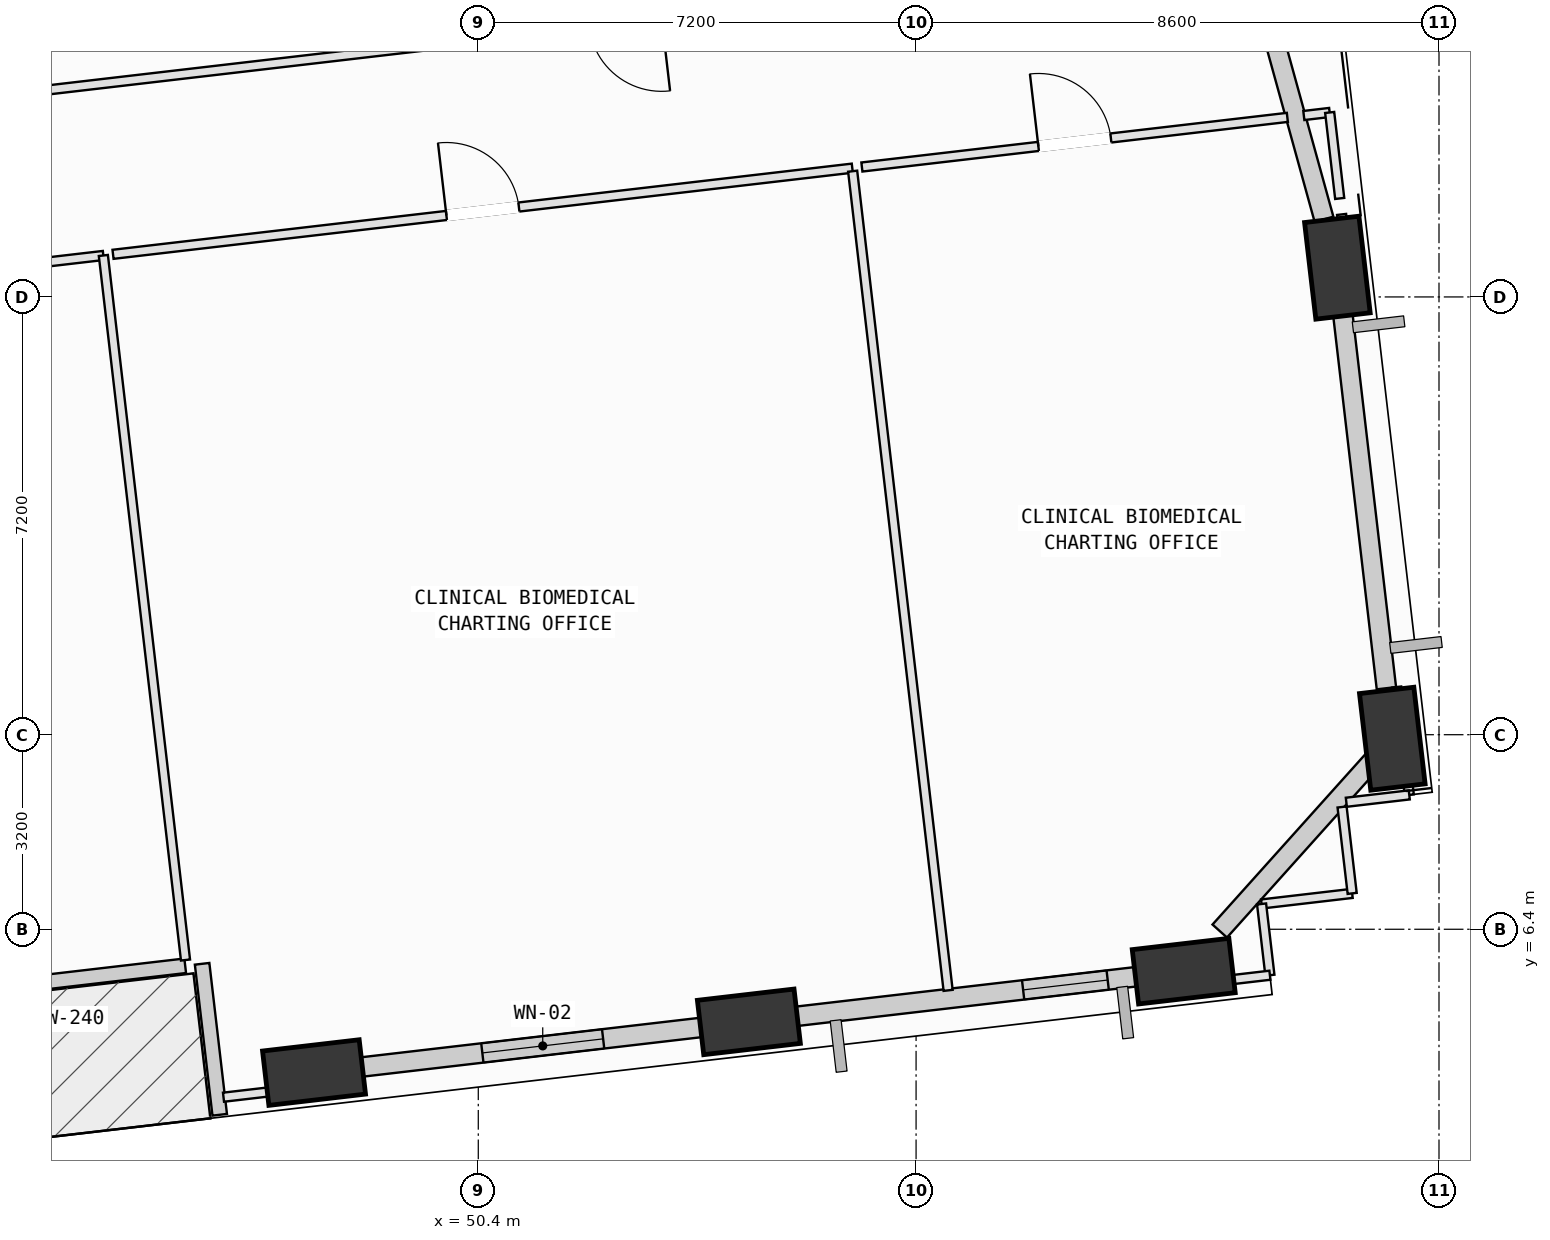
"""IFC4 building model, lengths in metres.
Left out: names, types, materials, properties, quantities, classifications, styles, units other than length and angle.
Written with IfcOpenShell. Run it as: python <this file> out.ifc"""

import sys

from ifc_helpers import new_model, si_unit, direction, frame, frame_2d, origin, origin_2d, place, context, subcontext, project, spatial, rectangle, extrude, element, fill, save


model = new_model("IFC4")
c1 = context("Model", 3, precision=1e-05, world=origin(), true_north=direction((0.0, 1.0)))
c2 = subcontext(c1, "Body", "Model", "MODEL_VIEW")
j1 = project(units=[si_unit("LENGTHUNIT", "METRE"), si_unit("PLANEANGLEUNIT", "RADIAN")], contexts=[c1])
p1 = place(None, origin())
s1 = spatial("IfcSite", under=j1, at=p1, CompositionType="ELEMENT")
p2 = place(p1, origin())
s2 = spatial("IfcBuilding", under=s1, at=p2, CompositionType="ELEMENT")
p3 = place(p2, frame((0.0, 0.0, 51.0)))
s3 = spatial("IfcBuildingStorey", under=s2, at=p3, CompositionType="ELEMENT", Elevation=51.0)
p4 = place(p3, frame((47.699, 4.043, 0.002), z_axis=(0.085124052379, 0.05881519108, 0.994632931792), x_axis=(-0.659384819993, 0.751710113435, 0.011981841356)))
e1 = element("IfcColumn", 1, at=p4, inside=s3, PredefinedType="COLUMN", context=c2, shape_type="SweptSolid", body=[
    extrude(rectangle(XDim=1.6, YDim=0.9, at=origin_2d()), origin(), (0.0, 0.0, 1.0), 4.018),
])
p5 = place(p3, frame((54.85, 4.877, 0.002), z_axis=(0.081266808668, 0.08811990522, 0.992789296937), x_axis=(-0.808110427631, 0.588867417033, 0.013881711428)))
e2 = element("IfcColumn", 2, at=p5, inside=s3, PredefinedType="COLUMN", context=c2, shape_type="SweptSolid", body=[
    extrude(rectangle(XDim=1.6, YDim=0.9, at=origin_2d()), origin(), (0.0, 0.0, 1.0), 4.026),
])
p6 = place(p3, frame((62.002, 5.711, 0.002), z_axis=(0.077356398515, 0.11721399556, 0.990089322664), x_axis=(-0.892164731917, 0.451417315565, 0.016263404677)))
e3 = element("IfcColumn", 3, at=p6, inside=s3, PredefinedType="COLUMN", context=c2, shape_type="SweptSolid", body=[
    extrude(rectangle(XDim=1.6, YDim=0.9, at=origin_2d()), origin(), (0.0, 0.0, 1.0), 4.037),
])
p7 = place(p3, frame((65.432, 9.534, 0.002), z_axis=(0.061531325336, 0.131101615573, 0.989457559674), x_axis=(-0.312732734416, -0.938885386436, 0.143848767674)))
e4 = element("IfcColumn", 4, at=p7, inside=s3, PredefinedType="COLUMN", context=c2, shape_type="SweptSolid", body=[
    extrude(rectangle(XDim=1.6, YDim=0.9, at=origin_2d()), origin(), (0.0, 0.0, 1.0), 4.039),
])
p8 = place(p3, frame((64.529, 17.281, 0.002), z_axis=(0.029857269994, 0.127362756182, 0.991406713598), x_axis=(-0.112008268746, -0.985175573606, 0.129935510555)))
e5 = element("IfcColumn", 5, at=p8, inside=s3, PredefinedType="COLUMN", context=c2, shape_type="SweptSolid", body=[
    extrude(rectangle(XDim=1.6, YDim=0.9, at=origin_2d()), origin(), (0.0, 0.0, 1.0), 4.031),
])
p9 = place(p3, frame((45.58, 5.8, 0.0), z_axis=(0.0, 0.0, 1.0), x_axis=(-0.993269328475, -0.115827635352, 0.0)))
e6 = element("IfcWall", 6, at=p9, inside=s3, PredefinedType="SOLIDWALL", context=c2, shape_type="SweptSolid", body=[
    extrude(rectangle(XDim=6.96, YDim=0.24, at=frame_2d((3.48, 0.0))), origin(), (0.0, 0.0, 1.0), 3.165),
])
p10 = place(p9, frame((2.93, 0.0, 0.0)))
e7 = element("IfcOpeningElement", 7, at=p10, cuts=e6, PredefinedType="OPENING", context=c2, shape_type="SweptSolid", body=[
    extrude(rectangle(XDim=1.1, YDim=2.15, at=frame_2d((0.55, 1.075))), frame((0.0, 0.13, 0.0), z_axis=(0.0, -1.0, 0.0), x_axis=(1.0, 0.0, 0.0)), (0.0, 0.0, 1.0), 0.26),
])
p11 = place(p3, frame((46.148, 3.349, 0.0), z_axis=(0.0, 0.0, 1.0), x_axis=(-0.115821286172, 0.993270068848, 0.0)))
e8 = element("IfcWall", 8, at=p11, inside=s3, PredefinedType="SOLIDWALL", context=c2, shape_type="SweptSolid", body=[
    extrude(rectangle(XDim=2.5, YDim=0.24, at=frame_2d((1.25, 0.0))), origin(), (0.0, 0.0, 1.0), 3.165),
])
p12 = place(p3, frame((54.449, 4.83, 0.0), z_axis=(0.0, 0.0, 1.0), x_axis=(-0.993271471443, -0.115809257044, 0.0)))
e9 = element("IfcWall", 9, at=p12, inside=s3, PredefinedType="SOLIDWALL", context=c2, shape_type="SweptSolid", body=[
    extrude(rectangle(XDim=6.012, YDim=0.32, at=frame_2d((3.006, 0.0))), origin(), (0.0, 0.0, 1.0), 3.145),
])
p13 = place(p12, frame((2.009, 0.0, 0.75)))
e10 = element("IfcOpeningElement", 10, at=p13, cuts=e9, PredefinedType="OPENING", context=c2, shape_type="SweptSolid", body=[
    extrude(rectangle(XDim=2.0, YDim=1.95, at=frame_2d((1.0, 0.975))), frame((0.0, 0.17, 0.0), z_axis=(0.0, -1.0, 0.0), x_axis=(1.0, 0.0, 0.0)), (0.0, 0.0, 1.0), 0.34),
])
p14 = place(p3, frame((61.619, 5.666, 0.0), z_axis=(0.0, 0.0, 1.0), x_axis=(-0.993272743398, -0.11579834724, 0.0)))
e11 = element("IfcWall", 11, at=p14, inside=s3, PredefinedType="SOLIDWALL", context=c2, shape_type="SweptSolid", body=[
    extrude(rectangle(XDim=6.045, YDim=0.32, at=frame_2d((3.022, 0.0))), origin(), (0.0, 0.0, 1.0), 3.165),
])
p15 = place(p14, frame((0.874, 0.0, 0.75)))
e12 = element("IfcOpeningElement", 12, at=p15, cuts=e11, PredefinedType="OPENING", context=c2, shape_type="SweptSolid", body=[
    extrude(rectangle(XDim=1.4, YDim=1.85, at=frame_2d((0.7, 0.925))), frame((0.0, 0.17, 0.0), z_axis=(0.0, -1.0, 0.0), x_axis=(1.0, 0.0, 0.0)), (0.0, 0.0, 1.0), 0.34),
])
p16 = place(p3, frame((65.217, 9.294, 0.0), z_axis=(0.0, 0.0, 1.0), x_axis=(-0.667878843699, -0.744270011582, 0.0)))
e13 = element("IfcWall", 13, at=p16, inside=s3, PredefinedType="SOLIDWALL", context=c2, shape_type="SweptSolid", body=[
    extrude(rectangle(XDim=3.928, YDim=0.32, at=frame_2d((1.964, 0.0))), origin(), (0.0, 0.0, 1.0), 3.165),
])
p17 = place(p3, frame((64.57, 16.93, 0.0), z_axis=(0.0, 0.0, 1.0), x_axis=(0.115825434827, -0.993269585081, 0.0)))
e14 = element("IfcWall", 14, at=p17, inside=s3, PredefinedType="SOLIDWALL", context=c2, shape_type="SweptSolid", body=[
    extrude(rectangle(XDim=6.61, YDim=0.32, at=frame_2d((3.305, 0.0))), origin(), (0.0, 0.0, 1.0), 3.165),
])
p18 = place(p3, frame((62.015, 26.38, 0.0), z_axis=(0.0, 0.0, 1.0), x_axis=(0.266250491898, -0.963903872574, 0.0)))
e15 = element("IfcWall", 15, at=p18, inside=s3, PredefinedType="SOLIDWALL", context=c2, shape_type="SweptSolid", body=[
    extrude(rectangle(XDim=8.614, YDim=0.32, at=frame_2d((4.307, 0.0))), origin(), (0.0, 0.0, 1.0), 3.165),
])
p19 = place(p3, frame((36.5, 16.581, 0.0), z_axis=(0.0, 0.0, 1.0), x_axis=(0.993283935169, 0.115702308251, 0.0)))
e16 = element("IfcWall", 16, at=p19, inside=s3, PredefinedType="PARTITIONING", context=c2, shape_type="SweptSolid", body=[
    extrude(rectangle(XDim=7.786, YDim=0.15, at=frame_2d((3.893, 0.0))), origin(), (0.0, 0.0, 1.0), 3.78),
])
p20 = place(p19, frame((3.293, 0.0, 0.0)))
e17 = element("IfcOpeningElement", 17, at=p20, cuts=e16, PredefinedType="OPENING", context=c2, shape_type="SweptSolid", body=[
    extrude(rectangle(XDim=1.2, YDim=2.15, at=frame_2d((0.6, 1.075))), frame((0.0, 0.085, 0.0), z_axis=(0.0, -1.0, 0.0), x_axis=(1.0, 0.0, 0.0)), (0.0, 0.0, 1.0), 0.17),
])
p21 = place(p3, frame((44.234, 17.482, 0.0), z_axis=(0.0, 0.0, 1.0), x_axis=(0.115809127061, -0.993271486598, 0.0)))
e18 = element("IfcWall", 18, at=p21, inside=s3, PredefinedType="PARTITIONING", context=c2, shape_type="SweptSolid", body=[
    extrude(rectangle(XDim=11.667, YDim=0.15, at=frame_2d((5.833, 0.0))), origin(), (0.0, 0.0, 1.0), 3.78),
])
p22 = place(p3, frame((44.393, 17.501, 0.0), z_axis=(0.0, 0.0, 1.0), x_axis=(0.993276639016, 0.115764927265, 0.0)))
e19 = element("IfcWall", 19, at=p22, inside=s3, PredefinedType="PARTITIONING", context=c2, shape_type="SweptSolid", body=[
    extrude(rectangle(XDim=12.24, YDim=0.15, at=frame_2d((6.12, 0.0))), origin(), (0.0, 0.0, 1.0), 3.78),
])
p23 = place(p22, frame((5.52, 0.0, 0.0)))
e20 = element("IfcOpeningElement", 20, at=p23, cuts=e19, PredefinedType="OPENING", context=c2, shape_type="SweptSolid", body=[
    extrude(rectangle(XDim=1.2, YDim=2.15, at=frame_2d((0.6, 1.075))), frame((0.0, 0.085, 0.0), z_axis=(0.0, -1.0, 0.0), x_axis=(1.0, 0.0, 0.0)), (0.0, 0.0, 1.0), 0.17),
])
p24 = place(p3, frame((56.557, 18.868, 0.0), z_axis=(0.0, 0.0, 1.0), x_axis=(0.115751957705, -0.993278150513, 0.0)))
e21 = element("IfcWall", 21, at=p24, inside=s3, PredefinedType="PARTITIONING", context=c2, shape_type="SweptSolid", body=[
    extrude(rectangle(XDim=13.564, YDim=0.15, at=frame_2d((6.782, 0.0))), origin(), (0.0, 0.0, 1.0), 3.78),
])
p25 = place(p3, frame((55.642, 4.737, 0.0), z_axis=(0.0, 0.0, 1.0), x_axis=(-0.993267925726, -0.115839663867, 0.0)))
e22 = element("IfcWall", 22, at=p25, inside=s3, PredefinedType="PARTITIONING", context=c2, shape_type="SweptSolid", body=[
    extrude(rectangle(XDim=1.174, YDim=0.15, at=frame_2d((0.587, 0.0))), origin(), (0.0, 0.0, 1.0), 3.78),
])
p26 = place(p3, frame((48.504, 3.905, 0.0), z_axis=(0.0, 0.0, 1.0), x_axis=(-0.993289881522, -0.115651248445, 0.0)))
e23 = element("IfcWall", 23, at=p26, inside=s3, PredefinedType="PARTITIONING", context=c2, shape_type="SweptSolid", body=[
    extrude(rectangle(XDim=2.309, YDim=0.15, at=frame_2d((1.155, 0.0))), origin(), (0.0, 0.0, 1.0), 3.145),
])
p27 = place(p3, frame((64.772, 6.99, 0.0), z_axis=(0.0, 0.0, 1.0), x_axis=(-0.993244706562, -0.116038583611, 0.0)))
e24 = element("IfcWall", 24, at=p27, inside=s3, PredefinedType="PARTITIONING", context=c2, shape_type="SweptSolid", body=[
    extrude(rectangle(XDim=1.5, YDim=0.15, at=frame_2d((0.75, 0.0))), origin(), (0.0, 0.0, 1.0), 3.78),
])
p28 = place(p3, frame((63.282, 6.816, 0.0), z_axis=(0.0, 0.0, 1.0), x_axis=(0.11608484331, -0.993239301052, 0.0)))
e25 = element("IfcWall", 25, at=p28, inside=s3, PredefinedType="PARTITIONING", context=c2, shape_type="SweptSolid", body=[
    extrude(rectangle(XDim=1.18, YDim=0.15, at=frame_2d((0.59, 0.0))), origin(), (0.0, 0.0, 1.0), 3.78),
])
p29 = place(p3, frame((63.419, 5.644, 0.0), z_axis=(0.0, 0.0, 1.0), x_axis=(-0.993251064324, -0.115984150723, 0.0)))
e26 = element("IfcWall", 26, at=p29, inside=s3, PredefinedType="PARTITIONING", context=c2, shape_type="SweptSolid", body=[
    extrude(rectangle(XDim=1.785, YDim=0.15, at=frame_2d((0.893, 0.0))), origin(), (0.0, 0.0, 1.0), 3.78),
])
p30 = place(p3, frame((56.709, 18.937, 0.0), z_axis=(0.0, 0.0, 1.0), x_axis=(0.993269785823, 0.115823713336, 0.0)))
e27 = element("IfcWall", 27, at=p30, inside=s3, PredefinedType="PARTITIONING", context=c2, shape_type="SweptSolid", body=[
    extrude(rectangle(XDim=7.044, YDim=0.15, at=frame_2d((3.522, 0.0))), origin(), (0.0, 0.0, 1.0), 3.78),
])
p31 = place(p30, frame((2.922, 0.0, 0.0)))
e28 = element("IfcOpeningElement", 28, at=p31, cuts=e27, PredefinedType="OPENING", context=c2, shape_type="SweptSolid", body=[
    extrude(rectangle(XDim=1.2, YDim=2.15, at=frame_2d((0.6, 1.075))), frame((0.0, 0.085, 0.0), z_axis=(0.0, -1.0, 0.0), x_axis=(1.0, 0.0, 0.0)), (0.0, 0.0, 1.0), 0.17),
])
p32 = place(p3, frame((63.977, 19.784, 0.0), z_axis=(0.0, 0.0, 1.0), x_axis=(0.99313891796, 0.116940538875, 0.0)))
e29 = element("IfcWall", 29, at=p32, inside=s3, PredefinedType="PARTITIONING", context=c2, shape_type="SweptSolid", body=[
    extrude(rectangle(XDim=0.428, YDim=0.15, at=frame_2d((0.214, 0.0))), origin(), (0.0, 0.0, 1.0), 3.78),
])
p33 = place(p3, frame((64.402, 19.834, 0.0), z_axis=(0.0, 0.0, 1.0), x_axis=(0.115756627121, -0.993277606351, 0.0)))
e30 = element("IfcWall", 30, at=p33, inside=s3, PredefinedType="PARTITIONING", context=c2, shape_type="SweptSolid", body=[
    extrude(rectangle(XDim=1.424, YDim=0.15, at=frame_2d((0.712, 0.0))), origin(), (0.0, 0.0, 1.0), 3.165),
])
p34 = place(p3, frame((64.598, 18.157, 0.0), z_axis=(0.0, 0.0, 1.0), x_axis=(0.11532567152, -0.993327735185, 0.0)))
e31 = element("IfcWall", 31, at=p34, inside=s3, PredefinedType="PARTITIONING", context=c2, shape_type="SweptSolid", body=[
    extrude(rectangle(XDim=1.215, YDim=0.15, at=frame_2d((0.607, 0.0))), origin(), (0.0, 0.0, 1.0), 3.165),
])
p35 = place(p3, frame((65.504, 10.384, 0.0), z_axis=(0.0, 0.0, 1.0), x_axis=(0.115921158614, -0.993258418029, 0.0)))
e32 = element("IfcWall", 32, at=p35, inside=s3, PredefinedType="PARTITIONING", context=c2, shape_type="SweptSolid", body=[
    extrude(rectangle(XDim=1.786, YDim=0.15, at=frame_2d((0.893, 0.0))), origin(), (0.0, 0.0, 1.0), 3.165),
])
p36 = place(p3, frame((65.711, 8.61, 0.0), z_axis=(0.0, 0.0, 1.0), x_axis=(-0.99322397799, -0.116215874754, 0.0)))
e33 = element("IfcWall", 33, at=p36, inside=s3, PredefinedType="PARTITIONING", context=c2, shape_type="SweptSolid", body=[
    extrude(rectangle(XDim=1.042, YDim=0.15, at=frame_2d((0.521, 0.0))), origin(), (0.0, 0.0, 1.0), 3.78),
])
p37 = place(p3, frame((64.606, 8.411, 0.0), z_axis=(0.0, 0.0, 1.0), x_axis=(0.116049066602, -0.993243481801, 0.0)))
e34 = element("IfcWall", 34, at=p37, inside=s3, PredefinedType="PARTITIONING", context=c2, shape_type="SweptSolid", body=[
    extrude(rectangle(XDim=1.431, YDim=0.15, at=frame_2d((0.715, 0.0))), origin(), (0.0, 0.0, 1.0), 3.78),
])
p38 = place(p3, frame((62.949, 22.493, 0.0), z_axis=(0.0, 0.0, 1.0), x_axis=(-0.993272940405, -0.115796657373, 0.0)))
e35 = element("IfcWall", 35, at=p38, inside=s3, PredefinedType="PARTITIONING", context=c2, shape_type="SweptSolid", body=[
    extrude(rectangle(XDim=20.396, YDim=0.15, at=frame_2d((10.198, 0.0))), origin(), (0.0, 0.0, 1.0), 3.78),
])
p39 = place(p38, frame((9.598, 0.0, 0.0)))
e36 = element("IfcOpeningElement", 36, at=p39, cuts=e35, PredefinedType="OPENING", context=c2, shape_type="SweptSolid", body=[
    extrude(rectangle(XDim=1.2, YDim=2.15, at=frame_2d((0.6, 1.075))), frame((0.0, 0.085, 0.0), z_axis=(0.0, -1.0, 0.0), x_axis=(1.0, 0.0, 0.0)), (0.0, 0.0, 1.0), 0.17),
])
p40 = place(p13, origin())
e37 = element("IfcWindow", 37, at=p40, inside=s3, PartitioningType="SINGLE_PANEL", PredefinedType="WINDOW", context=c2, shape_type="SweptSolid", body=[
    extrude(rectangle(XDim=2.0, YDim=1.95, at=frame_2d((1.0, 0.975))), frame((0.0, 0.03, 0.0), z_axis=(0.0, -1.0, 0.0), x_axis=(1.0, 0.0, 0.0)), (0.0, 0.0, 1.0), 0.06),
])
fill(e10, e37)
p41 = place(p15, origin())
e38 = element("IfcWindow", 38, at=p41, inside=s3, PartitioningType="SINGLE_PANEL", PredefinedType="WINDOW", context=c2, shape_type="SweptSolid", body=[
    extrude(rectangle(XDim=1.4, YDim=1.85, at=frame_2d((0.7, 0.925))), frame((0.0, 0.03, 0.0), z_axis=(0.0, -1.0, 0.0), x_axis=(1.0, 0.0, 0.0)), (0.0, 0.0, 1.0), 0.06),
])
fill(e12, e38)
p42 = place(p23, origin())
e39 = element("IfcDoor", 39, at=p42, inside=s3, OperationType="SINGLE_SWING_LEFT", PredefinedType="DOOR", context=c2, shape_type="SweptSolid", body=[
    extrude(rectangle(XDim=1.2, YDim=2.15, at=frame_2d((0.6, 1.075))), frame((0.0, 0.025, 0.0), z_axis=(0.0, -1.0, 0.0), x_axis=(1.0, 0.0, 0.0)), (0.0, 0.0, 1.0), 0.05),
])
fill(e20, e39)
p43 = place(p31, origin())
e40 = element("IfcDoor", 40, at=p43, inside=s3, OperationType="SINGLE_SWING_LEFT", PredefinedType="DOOR", context=c2, shape_type="SweptSolid", body=[
    extrude(rectangle(XDim=1.2, YDim=2.15, at=frame_2d((0.6, 1.075))), frame((0.0, 0.025, 0.0), z_axis=(0.0, -1.0, 0.0), x_axis=(1.0, 0.0, 0.0)), (0.0, 0.0, 1.0), 0.05),
])
fill(e28, e40)
save(model, sys.argv[1])
